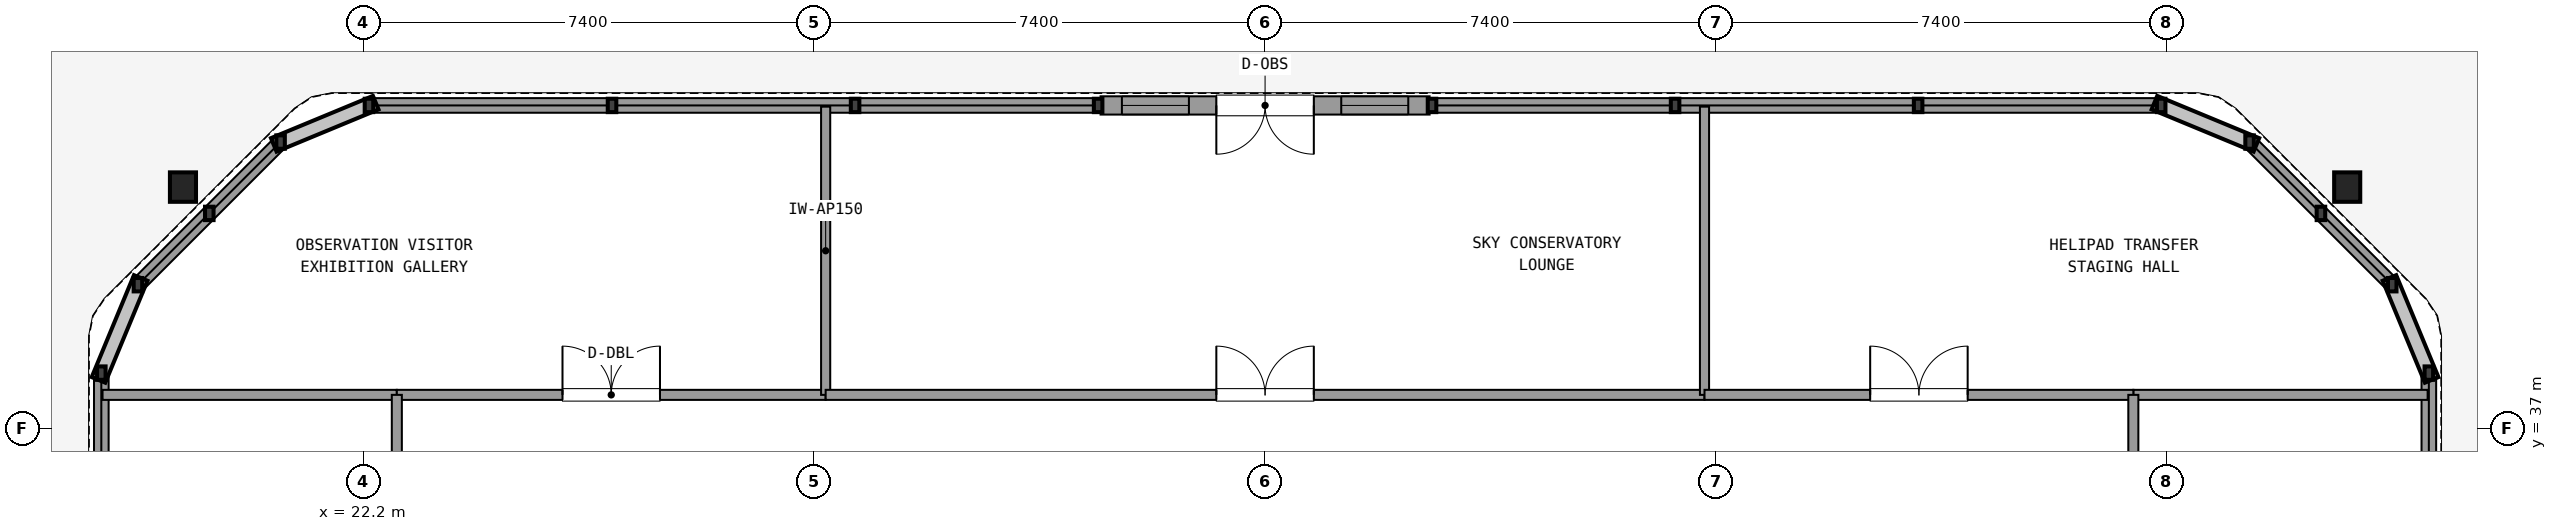
"""IFC4 building model, lengths in metres.
Left out: names, types, materials, properties, quantities, classifications, styles, units other than length and angle.
Written with IfcOpenShell. Run it as: python <this file> out.ifc"""

import sys

from ifc_helpers import new_model, si_unit, direction, frame, frame_2d, origin, origin_2d, place, context, subcontext, project, spatial, rectangle, i_section, extrude, element, fill, save


model = new_model("IFC4")
c1 = context("Model", 3, precision=1e-05, world=origin(), true_north=direction((0.0, 1.0)))
c2 = subcontext(c1, "Body", "Model", "MODEL_VIEW")
j1 = project(units=[si_unit("LENGTHUNIT", "METRE"), si_unit("PLANEANGLEUNIT", "RADIAN")], contexts=[c1])
p1 = place(None, origin())
s1 = spatial("IfcSite", under=j1, at=p1, CompositionType="ELEMENT")
p2 = place(p1, origin())
s2 = spatial("IfcBuilding", under=s1, at=p2, CompositionType="ELEMENT")
p3 = place(p2, frame((0.0, 0.0, 294.66)))
s3 = spatial("IfcBuildingStorey", under=s2, at=p3, CompositionType="ELEMENT", Elevation=294.66)
for number, where, z_axis, x_axis in (
    (1, (54.76, 40.96, 0.0), (0.0, 0.0, 1.0), (1.0, 0.0, 0.0)),
    (2, (19.24, 40.96, 0.0), (0.0, 0.0, 1.0), (1.0, 0.0, 0.0)),
):
    element("IfcColumn", number, at=place(p3, frame(where, z_axis=z_axis, x_axis=x_axis)), inside=s3, PredefinedType="COLUMN", context=c2, shape_type="SweptSolid", body=[
        extrude(i_section(OverallWidth=0.428, OverallDepth=0.483, WebThickness=0.042, FlangeThickness=0.068, at=origin_2d()), origin(), (0.0, 0.0, 1.0), 4.32),
    ])
p4 = place(p3, frame((56.1, 28.64, 0.0), z_axis=(0.0, 0.0, 1.0), x_axis=(0.0, 1.0, 0.0)))
e3 = element("IfcWall", 3, at=p4, inside=s3, PredefinedType="SOLIDWALL", context=c2, shape_type="SweptSolid", body=[
    extrude(rectangle(XDim=9.267, YDim=0.24, at=frame_2d((4.634, 0.0))), origin(), (0.0, 0.0, 1.0), 0.85),
])
p5 = place(p3, frame((55.499, 39.358, 0.0), z_axis=(0.0, 0.0, 1.0), x_axis=(-0.707106781187, 0.707106781187, 0.0)))
e4 = element("IfcWall", 4, at=p5, inside=s3, PredefinedType="SOLIDWALL", context=c2, shape_type="SweptSolid", body=[
    extrude(rectangle(XDim=3.311, YDim=0.24, at=frame_2d((1.655, 0.0))), origin(), (0.0, 0.0, 1.0), 0.85),
])
p6 = place(p3, frame((39.7, 42.3, 0.0), z_axis=(0.0, 0.0, 1.0), x_axis=(-1.0, 0.0, 0.0)))
e5 = element("IfcWall", 5, at=p6, inside=s3, PredefinedType="SOLIDWALL", context=c2, shape_type="SweptSolid", body=[
    extrude(rectangle(XDim=5.4, YDim=0.3, at=frame_2d((2.7, 0.0))), origin(), (0.0, 0.0, 1.0), 3.46),
])
p7 = place(p6, frame((1.9, 0.0, 0.0)))
e6 = element("IfcOpeningElement", 6, at=p7, cuts=e5, PredefinedType="OPENING", context=c2, shape_type="SweptSolid", body=[
    extrude(rectangle(XDim=1.6, YDim=2.2, at=frame_2d((0.8, 1.1))), frame((0.0, 0.16, 0.0), z_axis=(0.0, -1.0, 0.0), x_axis=(1.0, 0.0, 0.0)), (0.0, 0.0, 1.0), 0.32),
])
p8 = place(p6, frame((0.35, 0.0, 0.4)))
e7 = element("IfcOpeningElement", 7, at=p8, cuts=e5, PredefinedType="OPENING", context=c2, shape_type="SweptSolid", body=[
    extrude(rectangle(XDim=1.1, YDim=1.8, at=frame_2d((0.55, 0.9))), frame((0.0, 0.16, 0.0), z_axis=(0.0, -1.0, 0.0), x_axis=(1.0, 0.0, 0.0)), (0.0, 0.0, 1.0), 0.32),
])
p9 = place(p6, frame((3.95, 0.0, 0.4)))
e8 = element("IfcOpeningElement", 8, at=p9, cuts=e5, PredefinedType="OPENING", context=c2, shape_type="SweptSolid", body=[
    extrude(rectangle(XDim=1.1, YDim=1.8, at=frame_2d((0.55, 0.9))), frame((0.0, 0.16, 0.0), z_axis=(0.0, -1.0, 0.0), x_axis=(1.0, 0.0, 0.0)), (0.0, 0.0, 1.0), 0.32),
])
for number, where, z_axis, x_axis in (
    (9, (51.707, 42.3, 0.0), (0.0, 0.0, 1.0), (-1.0, 0.0, 0.0)),
    (10, (34.26, 42.3, 0.0), (0.0, 0.0, 1.0), (-1.0, 0.0, 0.0)),
):
    element("IfcWall", number, at=place(p3, frame(where, z_axis=z_axis, x_axis=x_axis)), inside=s3, PredefinedType="SOLIDWALL", context=c2, shape_type="SweptSolid", body=[
        extrude(rectangle(XDim=11.967, YDim=0.24, at=frame_2d((5.983, 0.0))), origin(), (0.0, 0.0, 1.0), 0.85),
    ])
p10 = place(p3, frame((20.842, 41.699, 0.0), z_axis=(0.0, 0.0, 1.0), x_axis=(-0.707106781187, -0.707106781187, 0.0)))
e11 = element("IfcWall", 11, at=p10, inside=s3, PredefinedType="SOLIDWALL", context=c2, shape_type="SweptSolid", body=[
    extrude(rectangle(XDim=3.311, YDim=0.24, at=frame_2d((1.655, 0.0))), origin(), (0.0, 0.0, 1.0), 0.85),
])
p11 = place(p3, frame((17.9, 37.907, 0.0), z_axis=(0.0, 0.0, 1.0), x_axis=(0.0, -1.0, 0.0)))
e12 = element("IfcWall", 12, at=p11, inside=s3, PredefinedType="SOLIDWALL", context=c2, shape_type="SweptSolid", body=[
    extrude(rectangle(XDim=9.267, YDim=0.24, at=frame_2d((4.634, 0.0))), origin(), (0.0, 0.0, 1.0), 0.85),
])
for number, where, z_axis, x_axis in (
    (13, (17.92, 37.55, 0.0), (0.0, 0.0, 1.0), (1.0, 0.0, 0.0)),
    (14, (51.25, 37.55, 0.0), (0.0, 0.0, 1.0), (1.0, 0.0, 0.0)),
):
    element("IfcWall", number, at=place(p3, frame(where, z_axis=z_axis, x_axis=x_axis)), inside=s3, PredefinedType="PARTITIONING", context=c2, shape_type="SweptSolid", body=[
        extrude(rectangle(XDim=4.83, YDim=0.165, at=frame_2d((2.415, 0.0))), origin(), (0.0, 0.0, 1.0), 3.31),
    ])
p12 = place(p3, frame((22.75, 37.55, 0.0), z_axis=(0.0, 0.0, 1.0), x_axis=(1.0, 0.0, 0.0)))
e15 = element("IfcWall", 15, at=p12, inside=s3, PredefinedType="PARTITIONING", context=c2, shape_type="SweptSolid", body=[
    extrude(rectangle(XDim=7.038, YDim=0.165, at=frame_2d((3.519, 0.0))), origin(), (0.0, 0.0, 1.0), 3.31),
])
p13 = place(p12, frame((2.719, 0.0, 0.0)))
e16 = element("IfcOpeningElement", 16, at=p13, cuts=e15, PredefinedType="OPENING", context=c2, shape_type="SweptSolid", body=[
    extrude(rectangle(XDim=1.6, YDim=2.2, at=frame_2d((0.8, 1.1))), frame((0.0, 0.093, 0.0), z_axis=(0.0, -1.0, 0.0), x_axis=(1.0, 0.0, 0.0)), (0.0, 0.0, 1.0), 0.185),
])
p14 = place(p3, frame((29.788, 37.55, 0.0), z_axis=(0.0, 0.0, 1.0), x_axis=(0.0, 1.0, 0.0)))
e17 = element("IfcWall", 17, at=p14, inside=s3, PredefinedType="PARTITIONING", context=c2, shape_type="SweptSolid", body=[
    extrude(rectangle(XDim=4.73, YDim=0.15, at=frame_2d((2.365, 0.0))), origin(), (0.0, 0.0, 1.0), 3.31),
])
p15 = place(p3, frame((29.788, 37.55, 0.0), z_axis=(0.0, 0.0, 1.0), x_axis=(1.0, 0.0, 0.0)))
e18 = element("IfcWall", 18, at=p15, inside=s3, PredefinedType="PARTITIONING", context=c2, shape_type="SweptSolid", body=[
    extrude(rectangle(XDim=14.424, YDim=0.165, at=frame_2d((7.212, 0.0))), origin(), (0.0, 0.0, 1.0), 3.31),
])
p16 = place(p15, frame((6.412, 0.0, 0.0)))
e19 = element("IfcOpeningElement", 19, at=p16, cuts=e18, PredefinedType="OPENING", context=c2, shape_type="SweptSolid", body=[
    extrude(rectangle(XDim=1.6, YDim=2.2, at=frame_2d((0.8, 1.1))), frame((0.0, 0.093, 0.0), z_axis=(0.0, -1.0, 0.0), x_axis=(1.0, 0.0, 0.0)), (0.0, 0.0, 1.0), 0.185),
])
p17 = place(p3, frame((44.212, 37.55, 0.0), z_axis=(0.0, 0.0, 1.0), x_axis=(0.0, 1.0, 0.0)))
e20 = element("IfcWall", 20, at=p17, inside=s3, PredefinedType="PARTITIONING", context=c2, shape_type="SweptSolid", body=[
    extrude(rectangle(XDim=4.73, YDim=0.15, at=frame_2d((2.365, 0.0))), origin(), (0.0, 0.0, 1.0), 3.31),
])
p18 = place(p3, frame((44.212, 37.55, 0.0), z_axis=(0.0, 0.0, 1.0), x_axis=(1.0, 0.0, 0.0)))
e21 = element("IfcWall", 21, at=p18, inside=s3, PredefinedType="PARTITIONING", context=c2, shape_type="SweptSolid", body=[
    extrude(rectangle(XDim=7.038, YDim=0.165, at=frame_2d((3.519, 0.0))), origin(), (0.0, 0.0, 1.0), 3.31),
])
p19 = place(p18, frame((2.719, 0.0, 0.0)))
e22 = element("IfcOpeningElement", 22, at=p19, cuts=e21, PredefinedType="OPENING", context=c2, shape_type="SweptSolid", body=[
    extrude(rectangle(XDim=1.6, YDim=2.2, at=frame_2d((0.8, 1.1))), frame((0.0, 0.093, 0.0), z_axis=(0.0, -1.0, 0.0), x_axis=(1.0, 0.0, 0.0)), (0.0, 0.0, 1.0), 0.185),
])
p20 = place(p3, frame((22.75, 14.25, 0.0), z_axis=(0.0, 0.0, 1.0), x_axis=(0.0, 1.0, 0.0)))
e23 = element("IfcWall", 23, at=p20, inside=s3, PredefinedType="PARTITIONING", context=c2, shape_type="SweptSolid", body=[
    extrude(rectangle(XDim=23.3, YDim=0.165, at=frame_2d((11.65, 0.0))), origin(), (0.0, 0.0, 1.0), 3.31),
])
p21 = place(p20, frame((10.85, 0.0, 0.0)))
e24 = element("IfcOpeningElement", 24, at=p21, cuts=e23, PredefinedType="OPENING", context=c2, shape_type="SweptSolid", body=[
    extrude(rectangle(XDim=1.6, YDim=2.2, at=frame_2d((0.8, 1.1))), frame((0.0, 0.093, 0.0), z_axis=(0.0, -1.0, 0.0), x_axis=(1.0, 0.0, 0.0)), (0.0, 0.0, 1.0), 0.185),
])
p22 = place(p3, frame((51.25, 14.25, 0.0), z_axis=(0.0, 0.0, 1.0), x_axis=(0.0, 1.0, 0.0)))
e25 = element("IfcWall", 25, at=p22, inside=s3, PredefinedType="PARTITIONING", context=c2, shape_type="SweptSolid", body=[
    extrude(rectangle(XDim=23.3, YDim=0.165, at=frame_2d((11.65, 0.0))), origin(), (0.0, 0.0, 1.0), 3.31),
])
p23 = place(p22, frame((10.85, 0.0, 0.0)))
e26 = element("IfcOpeningElement", 26, at=p23, cuts=e25, PredefinedType="OPENING", context=c2, shape_type="SweptSolid", body=[
    extrude(rectangle(XDim=1.6, YDim=2.2, at=frame_2d((0.8, 1.1))), frame((0.0, 0.093, 0.0), z_axis=(0.0, -1.0, 0.0), x_axis=(1.0, 0.0, 0.0)), (0.0, 0.0, 1.0), 0.185),
])
p24 = place(p7, origin())
e27 = element("IfcDoor", 27, at=p24, inside=s3, OperationType="DOUBLE_DOOR_SINGLE_SWING", PredefinedType="DOOR", context=c2, shape_type="SweptSolid", body=[
    extrude(rectangle(XDim=1.6, YDim=2.2, at=frame_2d((0.8, 1.1))), frame((0.0, 0.025, 0.0), z_axis=(0.0, -1.0, 0.0), x_axis=(1.0, 0.0, 0.0)), (0.0, 0.0, 1.0), 0.05),
])
fill(e6, e27)
p25 = place(p8, origin())
e28 = element("IfcWindow", 28, at=p25, inside=s3, PartitioningType="SINGLE_PANEL", PredefinedType="WINDOW", context=c2, shape_type="SweptSolid", body=[
    extrude(rectangle(XDim=1.1, YDim=1.8, at=frame_2d((0.55, 0.9))), frame((0.0, 0.03, 0.0), z_axis=(0.0, -1.0, 0.0), x_axis=(1.0, 0.0, 0.0)), (0.0, 0.0, 1.0), 0.06),
])
fill(e7, e28)
p26 = place(p9, origin())
e29 = element("IfcWindow", 29, at=p26, inside=s3, PartitioningType="SINGLE_PANEL", PredefinedType="WINDOW", context=c2, shape_type="SweptSolid", body=[
    extrude(rectangle(XDim=1.1, YDim=1.8, at=frame_2d((0.55, 0.9))), frame((0.0, 0.03, 0.0), z_axis=(0.0, -1.0, 0.0), x_axis=(1.0, 0.0, 0.0)), (0.0, 0.0, 1.0), 0.06),
])
fill(e8, e29)
p27 = place(p13, origin())
e30 = element("IfcDoor", 30, at=p27, inside=s3, OperationType="DOUBLE_DOOR_SINGLE_SWING", PredefinedType="DOOR", context=c2, shape_type="SweptSolid", body=[
    extrude(rectangle(XDim=1.6, YDim=2.2, at=frame_2d((0.8, 1.1))), frame((0.0, 0.025, 0.0), z_axis=(0.0, -1.0, 0.0), x_axis=(1.0, 0.0, 0.0)), (0.0, 0.0, 1.0), 0.05),
])
fill(e16, e30)
p28 = place(p16, origin())
e31 = element("IfcDoor", 31, at=p28, inside=s3, OperationType="DOUBLE_DOOR_SINGLE_SWING", PredefinedType="DOOR", context=c2, shape_type="SweptSolid", body=[
    extrude(rectangle(XDim=1.6, YDim=2.2, at=frame_2d((0.8, 1.1))), frame((0.0, 0.025, 0.0), z_axis=(0.0, -1.0, 0.0), x_axis=(1.0, 0.0, 0.0)), (0.0, 0.0, 1.0), 0.05),
])
fill(e19, e31)
p29 = place(p19, origin())
e32 = element("IfcDoor", 32, at=p29, inside=s3, OperationType="DOUBLE_DOOR_SINGLE_SWING", PredefinedType="DOOR", context=c2, shape_type="SweptSolid", body=[
    extrude(rectangle(XDim=1.6, YDim=2.2, at=frame_2d((0.8, 1.1))), frame((0.0, 0.025, 0.0), z_axis=(0.0, -1.0, 0.0), x_axis=(1.0, 0.0, 0.0)), (0.0, 0.0, 1.0), 0.05),
])
fill(e22, e32)
save(model, sys.argv[1])
